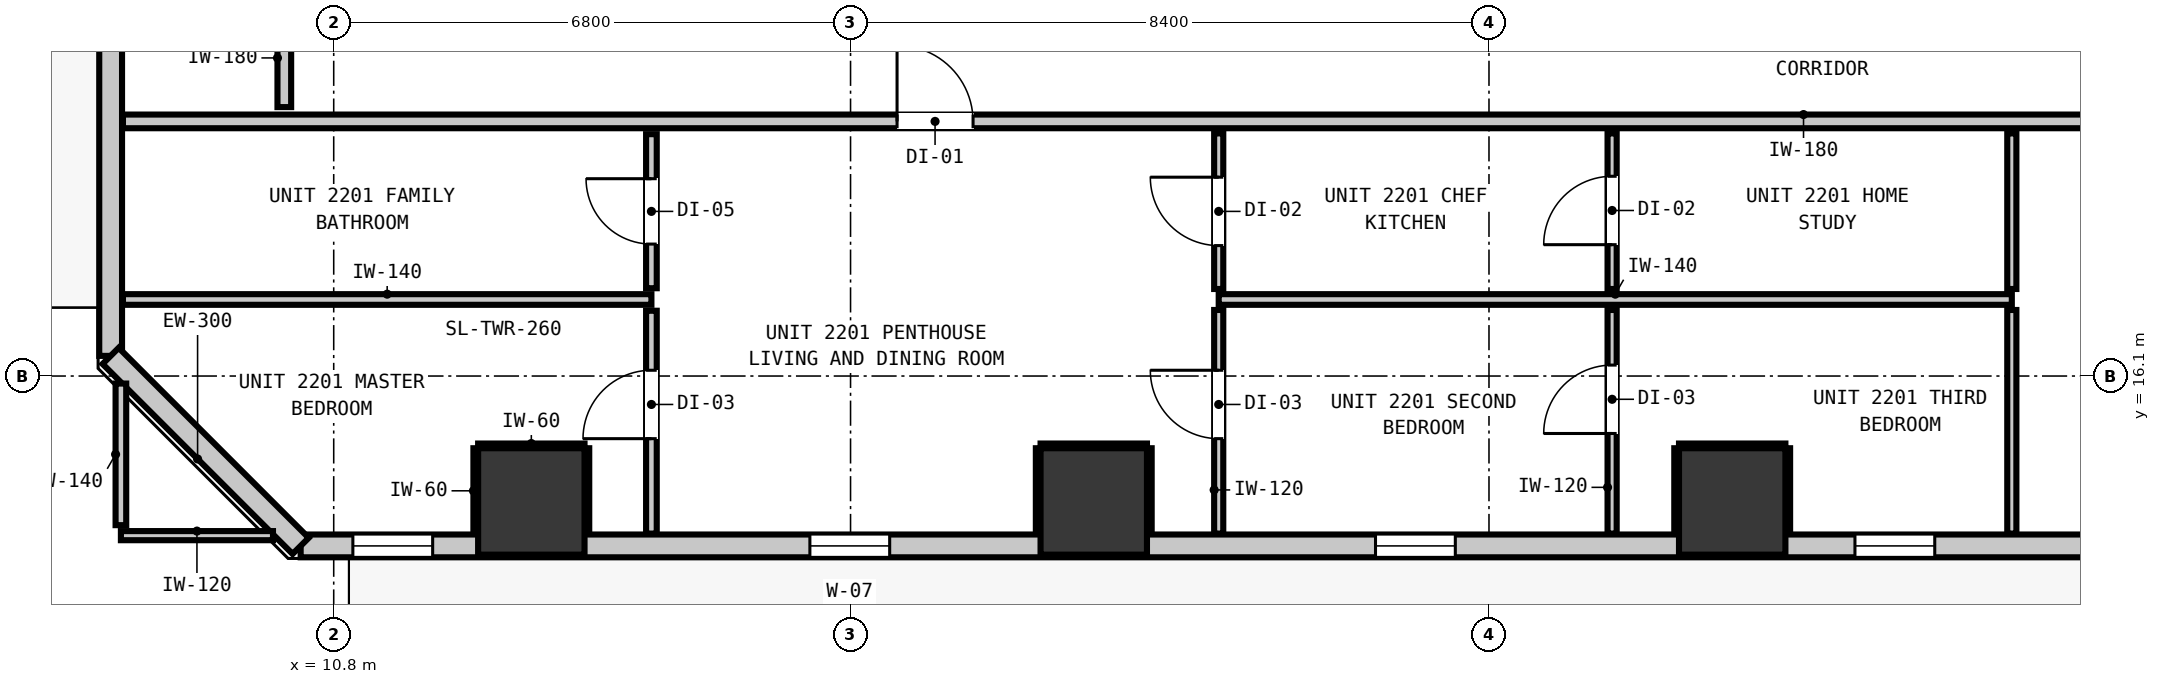
"""IFC4 building model, lengths in metres.
Left out: names, types, materials, properties, quantities, classifications, styles, units other than length and angle.
Written with IfcOpenShell. Run it as: python <this file> out.ifc"""

import sys

from ifc_helpers import new_model, si_unit, direction, frame, frame_2d, origin, origin_2d, place, context, subcontext, project, spatial, rectangle, extrude, element, fill, save


model = new_model("IFC4")
c1 = context("Model", 3, precision=1e-05, world=origin(), true_north=direction((0.0, 1.0)))
c2 = subcontext(c1, "Body", "Model", "MODEL_VIEW")
j1 = project(units=[si_unit("LENGTHUNIT", "METRE"), si_unit("PLANEANGLEUNIT", "RADIAN")], contexts=[c1])
p1 = place(None, origin())
s1 = spatial("IfcSite", under=j1, at=p1, CompositionType="ELEMENT")
p2 = place(p1, origin())
s2 = spatial("IfcBuilding", under=s1, at=p2, CompositionType="ELEMENT")
p3 = place(p2, frame((0.0, 0.0, 78.44)))
s3 = spatial("IfcBuildingStorey", under=s2, at=p3, CompositionType="ELEMENT", Elevation=78.44)
for number, where, z_axis, x_axis in (
    (1, (13.4, 14.45, 0.0), (0.0, 0.0, 1.0), (1.0, 0.0, 0.0)),
    (2, (20.8, 14.45, 0.0), (0.0, 0.0, 1.0), (1.0, 0.0, 0.0)),
    (3, (29.2, 14.45, 0.0), (0.0, 0.0, 1.0), (1.0, 0.0, 0.0)),
):
    element("IfcColumn", number, at=place(p3, frame(where, z_axis=z_axis, x_axis=x_axis)), inside=s3, PredefinedType="COLUMN", context=c2, shape_type="SweptSolid", body=[
        extrude(rectangle(XDim=1.4, YDim=1.4, at=origin_2d()), origin(), (0.0, 0.0, 1.0), 2.9),
    ])
p4 = place(p3, frame((7.865, 16.365, 0.0), z_axis=(0.0, 0.0, 1.0), x_axis=(0.0, 1.0, 0.0)))
e4 = element("IfcWall", 4, at=p4, inside=s3, PredefinedType="STANDARD", context=c2, shape_type="SweptSolid", body=[
    extrude(rectangle(XDim=34.67, YDim=0.3, at=frame_2d((17.335, 0.0))), origin(), (0.0, 0.0, 1.0), 2.9),
])
p5 = place(p4, frame((6.854, 0.0, 0.0)))
e5 = element("IfcOpeningElement", 5, at=p5, cuts=e4, PredefinedType="OPENING", context=c2, shape_type="SweptSolid", body=[
    extrude(rectangle(XDim=1.0, YDim=2.15, at=frame_2d((0.5, 1.075))), frame((0.0, 0.16, 0.0), z_axis=(0.0, -1.0, 0.0), x_axis=(1.0, 0.0, 0.0)), (0.0, 0.0, 1.0), 0.32),
])
p6 = place(p4, frame((29.608, 0.0, 0.85)))
e6 = element("IfcOpeningElement", 6, at=p6, cuts=e4, PredefinedType="OPENING", context=c2, shape_type="SweptSolid", body=[
    extrude(rectangle(XDim=1.05, YDim=1.65, at=frame_2d((0.525, 0.825))), frame((0.0, 0.16, 0.0), z_axis=(0.0, -1.0, 0.0), x_axis=(1.0, 0.0, 0.0)), (0.0, 0.0, 1.0), 0.32),
])
p7 = place(p4, frame((10.325, 0.0, 0.85)))
e7 = element("IfcOpeningElement", 7, at=p7, cuts=e4, PredefinedType="OPENING", context=c2, shape_type="SweptSolid", body=[
    extrude(rectangle(XDim=1.05, YDim=1.65, at=frame_2d((0.525, 0.825))), frame((0.0, 0.16, 0.0), z_axis=(0.0, -1.0, 0.0), x_axis=(1.0, 0.0, 0.0)), (0.0, 0.0, 1.0), 0.32),
])
p8 = place(p3, frame((47.835, 13.865, 0.0), z_axis=(0.0, 0.0, 1.0), x_axis=(-1.0, 0.0, 0.0)))
e8 = element("IfcWall", 8, at=p8, inside=s3, PredefinedType="STANDARD", context=c2, shape_type="SweptSolid", body=[
    extrude(rectangle(XDim=37.47, YDim=0.3, at=frame_2d((18.735, 0.0))), origin(), (0.0, 0.0, 1.0), 2.9),
])
p9 = place(p8, frame((0.901, 0.0, 0.0)))
e9 = element("IfcOpeningElement", 9, at=p9, cuts=e8, PredefinedType="OPENING", context=c2, shape_type="SweptSolid", body=[
    extrude(rectangle(XDim=1.0, YDim=2.15, at=frame_2d((0.5, 1.075))), frame((0.0, 0.16, 0.0), z_axis=(0.0, -1.0, 0.0), x_axis=(1.0, 0.0, 0.0)), (0.0, 0.0, 1.0), 0.32),
])
p10 = place(p8, frame((29.72, 0.0, 0.85)))
e10 = element("IfcOpeningElement", 10, at=p10, cuts=e8, PredefinedType="OPENING", context=c2, shape_type="SweptSolid", body=[
    extrude(rectangle(XDim=1.05, YDim=1.65, at=frame_2d((0.525, 0.825))), frame((0.0, 0.16, 0.0), z_axis=(0.0, -1.0, 0.0), x_axis=(1.0, 0.0, 0.0)), (0.0, 0.0, 1.0), 0.32),
])
p11 = place(p8, frame((35.733, 0.0, 0.85)))
e11 = element("IfcOpeningElement", 11, at=p11, cuts=e8, PredefinedType="OPENING", context=c2, shape_type="SweptSolid", body=[
    extrude(rectangle(XDim=1.05, YDim=1.65, at=frame_2d((0.525, 0.825))), frame((0.0, 0.16, 0.0), z_axis=(0.0, -1.0, 0.0), x_axis=(1.0, 0.0, 0.0)), (0.0, 0.0, 1.0), 0.32),
])
p12 = place(p8, frame((22.278, 0.0, 0.85)))
e12 = element("IfcOpeningElement", 12, at=p12, cuts=e8, PredefinedType="OPENING", context=c2, shape_type="SweptSolid", body=[
    extrude(rectangle(XDim=1.05, YDim=1.65, at=frame_2d((0.525, 0.825))), frame((0.0, 0.16, 0.0), z_axis=(0.0, -1.0, 0.0), x_axis=(1.0, 0.0, 0.0)), (0.0, 0.0, 1.0), 0.32),
])
p13 = place(p8, frame((15.97, 0.0, 0.85)))
e13 = element("IfcOpeningElement", 13, at=p13, cuts=e8, PredefinedType="OPENING", context=c2, shape_type="SweptSolid", body=[
    extrude(rectangle(XDim=1.05, YDim=1.65, at=frame_2d((0.525, 0.825))), frame((0.0, 0.16, 0.0), z_axis=(0.0, -1.0, 0.0), x_axis=(1.0, 0.0, 0.0)), (0.0, 0.0, 1.0), 0.32),
])
p14 = place(p8, frame((5.843, 0.0, 0.85)))
e14 = element("IfcOpeningElement", 14, at=p14, cuts=e8, PredefinedType="OPENING", context=c2, shape_type="SweptSolid", body=[
    extrude(rectangle(XDim=1.05, YDim=1.65, at=frame_2d((0.525, 0.825))), frame((0.0, 0.16, 0.0), z_axis=(0.0, -1.0, 0.0), x_axis=(1.0, 0.0, 0.0)), (0.0, 0.0, 1.0), 0.32),
])
p15 = place(p3, frame((10.365, 13.865, 0.0), z_axis=(0.0, 0.0, 1.0), x_axis=(-0.707106781187, 0.707106781187, 0.0)))
e15 = element("IfcWall", 15, at=p15, inside=s3, PredefinedType="STANDARD", context=c2, shape_type="SweptSolid", body=[
    extrude(rectangle(XDim=3.536, YDim=0.3, at=frame_2d((1.768, 0.0))), origin(), (0.0, 0.0, 1.0), 2.9),
])
p16 = place(p3, frame((8.027, 19.45, 0.0), z_axis=(0.0, 0.0, 1.0), x_axis=(1.0, 0.0, 0.0)))
e16 = element("IfcWall", 16, at=p16, inside=s3, PredefinedType="PARTITIONING", context=c2, shape_type="SweptSolid", body=[
    extrude(rectangle(XDim=42.146, YDim=0.18, at=frame_2d((21.073, 0.0))), origin(), (0.0, 0.0, 1.0), 2.9),
])
p17 = place(p16, frame((10.185, 0.0, 0.0)))
e17 = element("IfcOpeningElement", 17, at=p17, cuts=e16, PredefinedType="OPENING", context=c2, shape_type="SweptSolid", body=[
    extrude(rectangle(XDim=1.0, YDim=2.15, at=frame_2d((0.5, 1.075))), frame((0.0, 0.1, 0.0), z_axis=(0.0, -1.0, 0.0), x_axis=(1.0, 0.0, 0.0)), (0.0, 0.0, 1.0), 0.2),
])
p18 = place(p16, frame((33.038, 0.0, 0.0)))
e18 = element("IfcOpeningElement", 18, at=p18, cuts=e16, PredefinedType="OPENING", context=c2, shape_type="SweptSolid", body=[
    extrude(rectangle(XDim=0.9, YDim=2.1, at=frame_2d((0.45, 1.05))), frame((0.0, 0.1, 0.0), z_axis=(0.0, -1.0, 0.0), x_axis=(1.0, 0.0, 0.0)), (0.0, 0.0, 1.0), 0.2),
])
p19 = place(p3, frame((8.027, 17.107, 0.0), z_axis=(0.0, 0.0, 1.0), x_axis=(1.0, 0.0, 0.0)))
e19 = element("IfcWall", 19, at=p19, inside=s3, PredefinedType="PARTITIONING", context=c2, shape_type="SweptSolid", body=[
    extrude(rectangle(XDim=6.953, YDim=0.14, at=frame_2d((3.477, 0.0))), origin(), (0.0, 0.0, 1.0), 2.9),
])
p20 = place(p3, frame((22.444, 17.107, 0.0), z_axis=(0.0, 0.0, 1.0), x_axis=(1.0, 0.0, 0.0)))
e20 = element("IfcWall", 20, at=p20, inside=s3, PredefinedType="PARTITIONING", context=c2, shape_type="SweptSolid", body=[
    extrude(rectangle(XDim=10.435, YDim=0.14, at=frame_2d((5.217, 0.0))), origin(), (0.0, 0.0, 1.0), 2.9),
])
p21 = place(p3, frame((8.0, 14.0, 0.0), z_axis=(0.0, 0.0, 1.0), x_axis=(1.0, 0.0, 0.0)))
e21 = element("IfcWall", 21, at=p21, inside=s3, PredefinedType="PARTITIONING", context=c2, shape_type="SweptSolid", body=[
    extrude(rectangle(XDim=2.001, YDim=0.12, at=frame_2d((1.0, 0.0))), origin(), (0.0, 0.0, 1.0), 2.9),
])
p22 = place(p3, frame((10.15, 19.638, 0.0), z_axis=(0.0, 0.0, 1.0), x_axis=(0.0, 1.0, 0.0)))
e22 = element("IfcWall", 22, at=p22, inside=s3, PredefinedType="PARTITIONING", context=c2, shape_type="SweptSolid", body=[
    extrude(rectangle(XDim=1.294, YDim=0.18, at=frame_2d((0.647, 0.0))), origin(), (0.0, 0.0, 1.0), 2.9),
])
p23 = place(p3, frame((8.0, 14.138, 0.0), z_axis=(0.0, 0.0, 1.0), x_axis=(0.0, 1.0, 0.0)))
e23 = element("IfcWall", 23, at=p23, inside=s3, PredefinedType="PARTITIONING", context=c2, shape_type="SweptSolid", body=[
    extrude(rectangle(XDim=1.863, YDim=0.14, at=frame_2d((0.932, 0.0))), origin(), (0.0, 0.0, 1.0), 2.9),
])
p24 = place(p3, frame((14.98, 14.027, 0.0), z_axis=(0.0, 0.0, 1.0), x_axis=(0.0, 1.0, 0.0)))
e24 = element("IfcWall", 24, at=p24, inside=s3, PredefinedType="PARTITIONING", context=c2, shape_type="SweptSolid", body=[
    extrude(rectangle(XDim=2.932, YDim=0.14, at=frame_2d((1.466, 0.0))), origin(), (0.0, 0.0, 1.0), 2.9),
])
p25 = place(p24, frame((1.249, 0.0, 0.0)))
e25 = element("IfcOpeningElement", 25, at=p25, cuts=e24, PredefinedType="OPENING", context=c2, shape_type="SweptSolid", body=[
    extrude(rectangle(XDim=0.9, YDim=2.1, at=frame_2d((0.45, 1.05))), frame((0.0, 0.08, 0.0), z_axis=(0.0, -1.0, 0.0), x_axis=(1.0, 0.0, 0.0)), (0.0, 0.0, 1.0), 0.16),
])
p26 = place(p3, frame((14.98, 17.255, 0.0), z_axis=(0.0, 0.0, 1.0), x_axis=(0.0, 1.0, 0.0)))
e26 = element("IfcWall", 26, at=p26, inside=s3, PredefinedType="PARTITIONING", context=c2, shape_type="SweptSolid", body=[
    extrude(rectangle(XDim=2.027, YDim=0.14, at=frame_2d((1.014, 0.0))), origin(), (0.0, 0.0, 1.0), 2.9),
])
p27 = place(p26, frame((0.581, 0.0, 0.0)))
e27 = element("IfcOpeningElement", 27, at=p27, cuts=e26, PredefinedType="OPENING", context=c2, shape_type="SweptSolid", body=[
    extrude(rectangle(XDim=0.86, YDim=2.02, at=frame_2d((0.43, 1.01))), frame((0.0, 0.08, 0.0), z_axis=(0.0, -1.0, 0.0), x_axis=(1.0, 0.0, 0.0)), (0.0, 0.0, 1.0), 0.16),
])
p28 = place(p3, frame((22.444, 14.027, 0.0), z_axis=(0.0, 0.0, 1.0), x_axis=(0.0, 1.0, 0.0)))
e28 = element("IfcWall", 28, at=p28, inside=s3, PredefinedType="PARTITIONING", context=c2, shape_type="SweptSolid", body=[
    extrude(rectangle(XDim=2.942, YDim=0.12, at=frame_2d((1.471, 0.0))), origin(), (0.0, 0.0, 1.0), 2.9),
])
p29 = place(p28, frame((1.249, 0.0, 0.0)))
e29 = element("IfcOpeningElement", 29, at=p29, cuts=e28, PredefinedType="OPENING", context=c2, shape_type="SweptSolid", body=[
    extrude(rectangle(XDim=0.9, YDim=2.1, at=frame_2d((0.45, 1.05))), frame((0.0, 0.07, 0.0), z_axis=(0.0, -1.0, 0.0), x_axis=(1.0, 0.0, 0.0)), (0.0, 0.0, 1.0), 0.14),
])
p30 = place(p3, frame((22.444, 17.245, 0.0), z_axis=(0.0, 0.0, 1.0), x_axis=(0.0, 1.0, 0.0)))
e30 = element("IfcWall", 30, at=p30, inside=s3, PredefinedType="PARTITIONING", context=c2, shape_type="SweptSolid", body=[
    extrude(rectangle(XDim=2.047, YDim=0.12, at=frame_2d((1.023, 0.0))), origin(), (0.0, 0.0, 1.0), 2.9),
])
p31 = place(p30, frame((0.571, 0.0, 0.0)))
e31 = element("IfcOpeningElement", 31, at=p31, cuts=e30, PredefinedType="OPENING", context=c2, shape_type="SweptSolid", body=[
    extrude(rectangle(XDim=0.9, YDim=2.1, at=frame_2d((0.45, 1.05))), frame((0.0, 0.07, 0.0), z_axis=(0.0, -1.0, 0.0), x_axis=(1.0, 0.0, 0.0)), (0.0, 0.0, 1.0), 0.14),
])
p32 = place(p3, frame((27.62, 14.027, 0.0), z_axis=(0.0, 0.0, 1.0), x_axis=(0.0, 1.0, 0.0)))
e32 = element("IfcWall", 32, at=p32, inside=s3, PredefinedType="PARTITIONING", context=c2, shape_type="SweptSolid", body=[
    extrude(rectangle(XDim=2.942, YDim=0.12, at=frame_2d((1.471, 0.0))), origin(), (0.0, 0.0, 1.0), 2.9),
])
p33 = place(p32, frame((1.317, 0.0, 0.0)))
e33 = element("IfcOpeningElement", 33, at=p33, cuts=e32, PredefinedType="OPENING", context=c2, shape_type="SweptSolid", body=[
    extrude(rectangle(XDim=0.9, YDim=2.1, at=frame_2d((0.45, 1.05))), frame((0.0, 0.07, 0.0), z_axis=(0.0, -1.0, 0.0), x_axis=(1.0, 0.0, 0.0)), (0.0, 0.0, 1.0), 0.14),
])
p34 = place(p3, frame((27.62, 17.245, 0.0), z_axis=(0.0, 0.0, 1.0), x_axis=(0.0, 1.0, 0.0)))
e34 = element("IfcWall", 34, at=p34, inside=s3, PredefinedType="PARTITIONING", context=c2, shape_type="SweptSolid", body=[
    extrude(rectangle(XDim=2.047, YDim=0.12, at=frame_2d((1.023, 0.0))), origin(), (0.0, 0.0, 1.0), 2.9),
])
p35 = place(p34, frame((0.583, 0.0, 0.0)))
e35 = element("IfcOpeningElement", 35, at=p35, cuts=e34, PredefinedType="OPENING", context=c2, shape_type="SweptSolid", body=[
    extrude(rectangle(XDim=0.9, YDim=2.1, at=frame_2d((0.45, 1.05))), frame((0.0, 0.07, 0.0), z_axis=(0.0, -1.0, 0.0), x_axis=(1.0, 0.0, 0.0)), (0.0, 0.0, 1.0), 0.14),
])
p36 = place(p3, frame((32.879, 14.027, 0.0), z_axis=(0.0, 0.0, 1.0), x_axis=(0.0, 1.0, 0.0)))
e36 = element("IfcWall", 36, at=p36, inside=s3, PredefinedType="PARTITIONING", context=c2, shape_type="SweptSolid", body=[
    extrude(rectangle(XDim=2.942, YDim=0.12, at=frame_2d((1.471, 0.0))), origin(), (0.0, 0.0, 1.0), 2.9),
])
p37 = place(p3, frame((32.879, 17.245, 0.0), z_axis=(0.0, 0.0, 1.0), x_axis=(0.0, 1.0, 0.0)))
e37 = element("IfcWall", 37, at=p37, inside=s3, PredefinedType="PARTITIONING", context=c2, shape_type="SweptSolid", body=[
    extrude(rectangle(XDim=2.047, YDim=0.12, at=frame_2d((1.023, 0.0))), origin(), (0.0, 0.0, 1.0), 2.9),
])
p38 = place(p3, frame((12.7, 15.182, 0.0), z_axis=(0.0, 0.0, 1.0), x_axis=(1.0, 0.0, 0.0)))
e38 = element("IfcWall", 38, at=p38, inside=s3, PredefinedType="PARTITIONING", context=c2, shape_type="SweptSolid", body=[
    extrude(rectangle(XDim=1.4, YDim=0.06, at=frame_2d((0.7, 0.0))), origin(), (0.0, 0.0, 1.0), 1.45),
])
for number, where, z_axis, x_axis in (
    (39, (12.668, 14.03, 0.0), (0.0, 0.0, 1.0), (0.0, 1.0, 0.0)),
    (40, (14.132, 14.03, 0.0), (0.0, 0.0, 1.0), (0.0, 1.0, 0.0)),
):
    element("IfcWall", number, at=place(p3, frame(where, z_axis=z_axis, x_axis=x_axis)), inside=s3, PredefinedType="PARTITIONING", context=c2, shape_type="SweptSolid", body=[
        extrude(rectangle(XDim=1.12, YDim=0.06, at=frame_2d((0.56, 0.0))), origin(), (0.0, 0.0, 1.0), 1.45),
    ])
p39 = place(p3, frame((20.1, 15.182, 0.0), z_axis=(0.0, 0.0, 1.0), x_axis=(1.0, 0.0, 0.0)))
e41 = element("IfcWall", 41, at=p39, inside=s3, PredefinedType="PARTITIONING", context=c2, shape_type="SweptSolid", body=[
    extrude(rectangle(XDim=1.4, YDim=0.06, at=frame_2d((0.7, 0.0))), origin(), (0.0, 0.0, 1.0), 1.45),
])
for number, where, z_axis, x_axis in (
    (42, (20.068, 14.03, 0.0), (0.0, 0.0, 1.0), (0.0, 1.0, 0.0)),
    (43, (21.532, 14.03, 0.0), (0.0, 0.0, 1.0), (0.0, 1.0, 0.0)),
):
    element("IfcWall", number, at=place(p3, frame(where, z_axis=z_axis, x_axis=x_axis)), inside=s3, PredefinedType="PARTITIONING", context=c2, shape_type="SweptSolid", body=[
        extrude(rectangle(XDim=1.12, YDim=0.06, at=frame_2d((0.56, 0.0))), origin(), (0.0, 0.0, 1.0), 1.45),
    ])
p40 = place(p3, frame((28.5, 15.182, 0.0), z_axis=(0.0, 0.0, 1.0), x_axis=(1.0, 0.0, 0.0)))
e44 = element("IfcWall", 44, at=p40, inside=s3, PredefinedType="PARTITIONING", context=c2, shape_type="SweptSolid", body=[
    extrude(rectangle(XDim=1.4, YDim=0.06, at=frame_2d((0.7, 0.0))), origin(), (0.0, 0.0, 1.0), 1.45),
])
for number, where, z_axis, x_axis in (
    (45, (28.468, 14.03, 0.0), (0.0, 0.0, 1.0), (0.0, 1.0, 0.0)),
    (46, (29.932, 14.03, 0.0), (0.0, 0.0, 1.0), (0.0, 1.0, 0.0)),
):
    element("IfcWall", number, at=place(p3, frame(where, z_axis=z_axis, x_axis=x_axis)), inside=s3, PredefinedType="PARTITIONING", context=c2, shape_type="SweptSolid", body=[
        extrude(rectangle(XDim=1.12, YDim=0.06, at=frame_2d((0.56, 0.0))), origin(), (0.0, 0.0, 1.0), 1.45),
    ])
p41 = place(p10, origin())
e47 = element("IfcWindow", 47, at=p41, inside=s3, PartitioningType="SINGLE_PANEL", PredefinedType="WINDOW", context=c2, shape_type="SweptSolid", body=[
    extrude(rectangle(XDim=1.05, YDim=1.65, at=frame_2d((0.525, 0.825))), frame((0.0, 0.03, 0.0), z_axis=(0.0, -1.0, 0.0), x_axis=(1.0, 0.0, 0.0)), (0.0, 0.0, 1.0), 0.06),
])
fill(e10, e47)
p42 = place(p11, origin())
e48 = element("IfcWindow", 48, at=p42, inside=s3, PartitioningType="SINGLE_PANEL", PredefinedType="WINDOW", context=c2, shape_type="SweptSolid", body=[
    extrude(rectangle(XDim=1.05, YDim=1.65, at=frame_2d((0.525, 0.825))), frame((0.0, 0.03, 0.0), z_axis=(0.0, -1.0, 0.0), x_axis=(1.0, 0.0, 0.0)), (0.0, 0.0, 1.0), 0.06),
])
fill(e11, e48)
p43 = place(p12, origin())
e49 = element("IfcWindow", 49, at=p43, inside=s3, PartitioningType="SINGLE_PANEL", PredefinedType="WINDOW", context=c2, shape_type="SweptSolid", body=[
    extrude(rectangle(XDim=1.05, YDim=1.65, at=frame_2d((0.525, 0.825))), frame((0.0, 0.03, 0.0), z_axis=(0.0, -1.0, 0.0), x_axis=(1.0, 0.0, 0.0)), (0.0, 0.0, 1.0), 0.06),
])
fill(e12, e49)
p44 = place(p13, origin())
e50 = element("IfcWindow", 50, at=p44, inside=s3, PartitioningType="SINGLE_PANEL", PredefinedType="WINDOW", context=c2, shape_type="SweptSolid", body=[
    extrude(rectangle(XDim=1.05, YDim=1.65, at=frame_2d((0.525, 0.825))), frame((0.0, 0.03, 0.0), z_axis=(0.0, -1.0, 0.0), x_axis=(1.0, 0.0, 0.0)), (0.0, 0.0, 1.0), 0.06),
])
fill(e13, e50)
p45 = place(p17, origin())
e51 = element("IfcDoor", 51, at=p45, inside=s3, OperationType="SINGLE_SWING_LEFT", PredefinedType="DOOR", context=c2, shape_type="SweptSolid", body=[
    extrude(rectangle(XDim=1.0, YDim=2.15, at=frame_2d((0.5, 1.075))), frame((0.0, 0.025, 0.0), z_axis=(0.0, -1.0, 0.0), x_axis=(1.0, 0.0, 0.0)), (0.0, 0.0, 1.0), 0.05),
])
fill(e17, e51)
p46 = place(p27, origin())
e52 = element("IfcDoor", 52, at=p46, inside=s3, OperationType="SINGLE_SWING_RIGHT", PredefinedType="DOOR", context=c2, shape_type="SweptSolid", body=[
    extrude(rectangle(XDim=0.86, YDim=2.02, at=frame_2d((0.43, 1.01))), frame((0.0, 0.025, 0.0), z_axis=(0.0, -1.0, 0.0), x_axis=(1.0, 0.0, 0.0)), (0.0, 0.0, 1.0), 0.05),
])
fill(e27, e52)
p47 = place(p25, origin())
e53 = element("IfcDoor", 53, at=p47, inside=s3, OperationType="SINGLE_SWING_LEFT", PredefinedType="DOOR", context=c2, shape_type="SweptSolid", body=[
    extrude(rectangle(XDim=0.9, YDim=2.1, at=frame_2d((0.45, 1.05))), frame((0.0, 0.025, 0.0), z_axis=(0.0, -1.0, 0.0), x_axis=(1.0, 0.0, 0.0)), (0.0, 0.0, 1.0), 0.05),
])
fill(e25, e53)
p48 = place(p31, origin())
e54 = element("IfcDoor", 54, at=p48, inside=s3, OperationType="SINGLE_SWING_RIGHT", PredefinedType="DOOR", context=c2, shape_type="SweptSolid", body=[
    extrude(rectangle(XDim=0.9, YDim=2.1, at=frame_2d((0.45, 1.05))), frame((0.0, 0.025, 0.0), z_axis=(0.0, -1.0, 0.0), x_axis=(1.0, 0.0, 0.0)), (0.0, 0.0, 1.0), 0.05),
])
fill(e31, e54)
p49 = place(p35, origin())
e55 = element("IfcDoor", 55, at=p49, inside=s3, OperationType="SINGLE_SWING_LEFT", PredefinedType="DOOR", context=c2, shape_type="SweptSolid", body=[
    extrude(rectangle(XDim=0.9, YDim=2.1, at=frame_2d((0.45, 1.05))), frame((0.0, 0.025, 0.0), z_axis=(0.0, -1.0, 0.0), x_axis=(1.0, 0.0, 0.0)), (0.0, 0.0, 1.0), 0.05),
])
fill(e35, e55)
p50 = place(p29, origin())
e56 = element("IfcDoor", 56, at=p50, inside=s3, OperationType="SINGLE_SWING_RIGHT", PredefinedType="DOOR", context=c2, shape_type="SweptSolid", body=[
    extrude(rectangle(XDim=0.9, YDim=2.1, at=frame_2d((0.45, 1.05))), frame((0.0, 0.025, 0.0), z_axis=(0.0, -1.0, 0.0), x_axis=(1.0, 0.0, 0.0)), (0.0, 0.0, 1.0), 0.05),
])
fill(e29, e56)
p51 = place(p33, origin())
e57 = element("IfcDoor", 57, at=p51, inside=s3, OperationType="SINGLE_SWING_LEFT", PredefinedType="DOOR", context=c2, shape_type="SweptSolid", body=[
    extrude(rectangle(XDim=0.9, YDim=2.1, at=frame_2d((0.45, 1.05))), frame((0.0, 0.025, 0.0), z_axis=(0.0, -1.0, 0.0), x_axis=(1.0, 0.0, 0.0)), (0.0, 0.0, 1.0), 0.05),
])
fill(e33, e57)
save(model, sys.argv[1])
